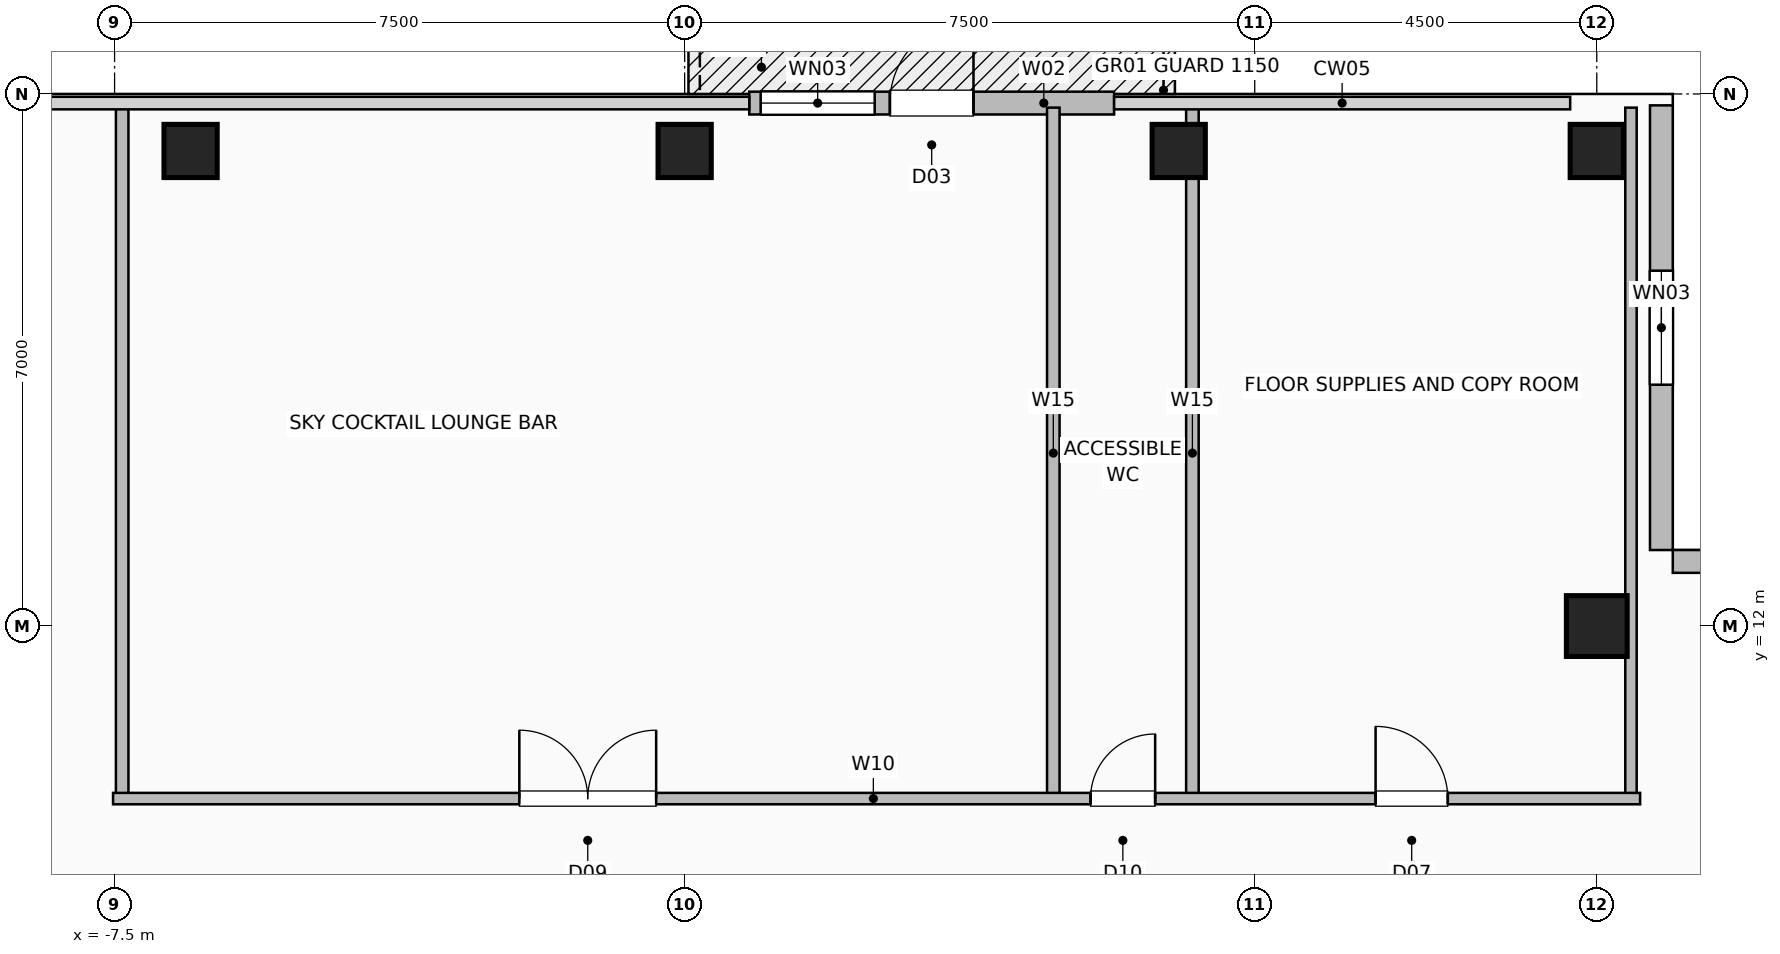
"""IFC4 building model, lengths in metres.
Left out: names, types, materials, properties, quantities, classifications, styles, units other than length and angle.
Written with IfcOpenShell. Run it as: python <this file> out.ifc"""

import sys

from ifc_helpers import new_model, si_unit, direction, frame, frame_2d, origin, origin_2d, place, context, subcontext, project, spatial, rectangle, hollow_rectangle, extrude, element, fill, save


model = new_model("IFC4")
c1 = context("Model", 3, precision=1e-05, world=origin(), true_north=direction((0.0, 1.0)))
c2 = subcontext(c1, "Body", "Model", "MODEL_VIEW")
j1 = project(units=[si_unit("LENGTHUNIT", "METRE"), si_unit("PLANEANGLEUNIT", "RADIAN")], contexts=[c1])
p1 = place(None, origin())
s1 = spatial("IfcSite", under=j1, at=p1, CompositionType="ELEMENT")
p2 = place(p1, origin())
s2 = spatial("IfcBuilding", under=s1, at=p2, CompositionType="ELEMENT")
p3 = place(p2, frame((0.0, 0.0, 254.0)))
s3 = spatial("IfcBuildingStorey", under=s2, at=p3, CompositionType="ELEMENT", Elevation=254.0)
for number, where, z_axis, x_axis in (
    (1, (-6.5, 18.25, 0.0), (0.0, 0.0, 1.0), (1.0, 0.0, 0.0)),
    (2, (0.0, 18.25, 0.0), (0.0, 0.0, 1.0), (1.0, 0.0, 0.0)),
    (3, (6.5, 18.25, 0.0), (0.0, 0.0, 1.0), (1.0, 0.0, 0.0)),
    (4, (12.0, 18.25, 0.0), (0.0, 0.0, 1.0), (1.0, 0.0, 0.0)),
):
    element("IfcColumn", number, at=place(p3, frame(where, z_axis=z_axis, x_axis=x_axis)), inside=s3, PredefinedType="COLUMN", context=c2, shape_type="SweptSolid", body=[
        extrude(hollow_rectangle(XDim=0.7, YDim=0.7, WallThickness=0.035, at=origin_2d()), origin(), (0.0, 0.0, 1.0), 3.6),
    ])
p4 = place(p3, frame((12.0, 12.0, 0.0), z_axis=(0.0, 0.0, 1.0), x_axis=(1.0, 0.0, 0.0)))
e5 = element("IfcColumn", 5, at=p4, inside=s3, PredefinedType="COLUMN", context=c2, shape_type="SweptSolid", body=[
    extrude(hollow_rectangle(XDim=0.8, YDim=0.8, WallThickness=0.04, at=origin_2d()), origin(), (0.0, 0.0, 1.0), 3.6),
])
p5 = place(p3, frame((0.85, 18.88, 0.0), z_axis=(0.0, 0.0, 1.0), x_axis=(1.0, 0.0, 0.0)))
e6 = element("IfcWall", 6, at=p5, inside=s3, PredefinedType="SOLIDWALL", context=c2, shape_type="SweptSolid", body=[
    extrude(rectangle(XDim=4.8, YDim=0.3, at=frame_2d((2.4, 0.0))), origin(), (0.0, 0.0, 1.0), 3.36),
])
p6 = place(p5, frame((1.85, 0.0, 0.0)))
e7 = element("IfcOpeningElement", 7, at=p6, cuts=e6, PredefinedType="OPENING", context=c2, shape_type="SweptSolid", body=[
    extrude(rectangle(XDim=1.1, YDim=2.2, at=frame_2d((0.55, 1.1))), frame((0.0, 0.16, 0.0), z_axis=(0.0, -1.0, 0.0), x_axis=(1.0, 0.0, 0.0)), (0.0, 0.0, 1.0), 0.32),
])
p7 = place(p5, frame((0.15, 0.0, 0.85)))
e8 = element("IfcOpeningElement", 8, at=p7, cuts=e6, PredefinedType="OPENING", context=c2, shape_type="SweptSolid", body=[
    extrude(rectangle(XDim=1.5, YDim=1.8, at=frame_2d((0.75, 0.9))), frame((0.0, 0.16, 0.0), z_axis=(0.0, -1.0, 0.0), x_axis=(1.0, 0.0, 0.0)), (0.0, 0.0, 1.0), 0.32),
])
p8 = place(p3, frame((12.85, 18.85, 0.0), z_axis=(0.0, 0.0, 1.0), x_axis=(0.0, -1.0, 0.0)))
e9 = element("IfcWall", 9, at=p8, inside=s3, PredefinedType="SOLIDWALL", context=c2, shape_type="SweptSolid", body=[
    extrude(rectangle(XDim=5.85, YDim=0.3, at=frame_2d((2.925, 0.0))), origin(), (0.0, 0.0, 1.0), 3.36),
])
p9 = place(p8, frame((2.175, 0.0, 0.9)))
e10 = element("IfcOpeningElement", 10, at=p9, cuts=e9, PredefinedType="OPENING", context=c2, shape_type="SweptSolid", body=[
    extrude(rectangle(XDim=1.5, YDim=1.8, at=frame_2d((0.75, 0.9))), frame((0.0, 0.16, 0.0), z_axis=(0.0, -1.0, 0.0), x_axis=(1.0, 0.0, 0.0)), (0.0, 0.0, 1.0), 0.32),
])
p10 = place(p3, frame((18.85, 12.85, 0.0), z_axis=(0.0, 0.0, 1.0), x_axis=(-1.0, 0.0, 0.0)))
e11 = element("IfcWall", 11, at=p10, inside=s3, PredefinedType="SOLIDWALL", context=c2, shape_type="SweptSolid", body=[
    extrude(rectangle(XDim=5.85, YDim=0.3, at=frame_2d((2.925, 0.0))), origin(), (0.0, 0.0, 1.0), 3.36),
])
for number, where, z_axis, x_axis in (
    (12, (6.68, 9.73, 0.0), (0.0, 0.0, 1.0), (0.0, 1.0, 0.0)),
    (13, (-7.4, 9.73, 0.0), (0.0, 0.0, 1.0), (0.0, 1.0, 0.0)),
    (14, (4.85, 9.73, 0.0), (0.0, 0.0, 1.0), (0.0, 1.0, 0.0)),
):
    element("IfcWall", number, at=place(p3, frame(where, z_axis=z_axis, x_axis=x_axis)), inside=s3, PredefinedType="PLUMBINGWALL", context=c2, shape_type="SweptSolid", body=[
        extrude(rectangle(XDim=9.09, YDim=0.165, at=frame_2d((4.545, 0.0))), origin(), (0.0, 0.0, 1.0), 3.36),
    ])
p11 = place(p3, frame((12.45, 9.73, 0.0), z_axis=(0.0, 0.0, 1.0), x_axis=(0.0, 1.0, 0.0)))
e15 = element("IfcWall", 15, at=p11, inside=s3, PredefinedType="PARTITIONING", context=c2, shape_type="SweptSolid", body=[
    extrude(rectangle(XDim=9.09, YDim=0.15, at=frame_2d((4.545, 0.0))), origin(), (0.0, 0.0, 1.0), 3.36),
])
p12 = place(p3, frame((-7.52, 9.73, 0.0), z_axis=(0.0, 0.0, 1.0), x_axis=(1.0, 0.0, 0.0)))
e16 = element("IfcWall", 16, at=p12, inside=s3, PredefinedType="PARTITIONING", context=c2, shape_type="SweptSolid", body=[
    extrude(rectangle(XDim=20.09, YDim=0.15, at=frame_2d((10.045, 0.0))), origin(), (0.0, 0.0, 1.0), 3.36),
])
p13 = place(p12, frame((5.345, 0.0, 0.0)))
e17 = element("IfcOpeningElement", 17, at=p13, cuts=e16, PredefinedType="OPENING", context=c2, shape_type="SweptSolid", body=[
    extrude(rectangle(XDim=1.8, YDim=2.08, at=frame_2d((0.9, 1.04))), frame((0.0, 0.085, 0.0), z_axis=(0.0, -1.0, 0.0), x_axis=(1.0, 0.0, 0.0)), (0.0, 0.0, 1.0), 0.17),
])
p14 = place(p12, frame((12.86, 0.0, 0.0)))
e18 = element("IfcOpeningElement", 18, at=p14, cuts=e16, PredefinedType="OPENING", context=c2, shape_type="SweptSolid", body=[
    extrude(rectangle(XDim=0.85, YDim=2.05, at=frame_2d((0.425, 1.025))), frame((0.0, 0.085, 0.0), z_axis=(0.0, -1.0, 0.0), x_axis=(1.0, 0.0, 0.0)), (0.0, 0.0, 1.0), 0.17),
])
p15 = place(p12, frame((16.61, 0.0, 0.0)))
e19 = element("IfcOpeningElement", 19, at=p15, cuts=e16, PredefinedType="OPENING", context=c2, shape_type="SweptSolid", body=[
    extrude(rectangle(XDim=0.95, YDim=2.06, at=frame_2d((0.475, 1.03))), frame((0.0, 0.085, 0.0), z_axis=(0.0, -1.0, 0.0), x_axis=(1.0, 0.0, 0.0)), (0.0, 0.0, 1.0), 0.17),
])
p16 = place(p6, origin())
e20 = element("IfcDoor", 20, at=p16, inside=s3, OperationType="SINGLE_SWING_RIGHT", PredefinedType="DOOR", context=c2, shape_type="SweptSolid", body=[
    extrude(rectangle(XDim=1.1, YDim=2.2, at=frame_2d((0.55, 1.1))), frame((0.0, 0.025, 0.0), z_axis=(0.0, -1.0, 0.0), x_axis=(1.0, 0.0, 0.0)), (0.0, 0.0, 1.0), 0.05),
])
fill(e7, e20)
p17 = place(p7, origin())
e21 = element("IfcWindow", 21, at=p17, inside=s3, PartitioningType="SINGLE_PANEL", PredefinedType="WINDOW", context=c2, shape_type="SweptSolid", body=[
    extrude(rectangle(XDim=1.5, YDim=1.8, at=frame_2d((0.75, 0.9))), frame((0.0, 0.03, 0.0), z_axis=(0.0, -1.0, 0.0), x_axis=(1.0, 0.0, 0.0)), (0.0, 0.0, 1.0), 0.06),
])
fill(e8, e21)
p18 = place(p9, origin())
e22 = element("IfcWindow", 22, at=p18, inside=s3, PartitioningType="SINGLE_PANEL", PredefinedType="WINDOW", context=c2, shape_type="SweptSolid", body=[
    extrude(rectangle(XDim=1.5, YDim=1.8, at=frame_2d((0.75, 0.9))), frame((0.0, 0.03, 0.0), z_axis=(0.0, -1.0, 0.0), x_axis=(1.0, 0.0, 0.0)), (0.0, 0.0, 1.0), 0.06),
])
fill(e10, e22)
p19 = place(p13, origin())
e23 = element("IfcDoor", 23, at=p19, inside=s3, OperationType="DOUBLE_DOOR_SINGLE_SWING", PredefinedType="DOOR", context=c2, shape_type="SweptSolid", body=[
    extrude(rectangle(XDim=1.8, YDim=2.08, at=frame_2d((0.9, 1.04))), frame((0.0, 0.025, 0.0), z_axis=(0.0, -1.0, 0.0), x_axis=(1.0, 0.0, 0.0)), (0.0, 0.0, 1.0), 0.05),
])
fill(e17, e23)
p20 = place(p14, origin())
e24 = element("IfcDoor", 24, at=p20, inside=s3, OperationType="SINGLE_SWING_RIGHT", PredefinedType="DOOR", context=c2, shape_type="SweptSolid", body=[
    extrude(rectangle(XDim=0.85, YDim=2.05, at=frame_2d((0.425, 1.025))), frame((0.0, 0.025, 0.0), z_axis=(0.0, -1.0, 0.0), x_axis=(1.0, 0.0, 0.0)), (0.0, 0.0, 1.0), 0.05),
])
fill(e18, e24)
p21 = place(p15, origin())
e25 = element("IfcDoor", 25, at=p21, inside=s3, OperationType="SINGLE_SWING_LEFT", PredefinedType="DOOR", context=c2, shape_type="SweptSolid", body=[
    extrude(rectangle(XDim=0.95, YDim=2.06, at=frame_2d((0.475, 1.03))), frame((0.0, 0.025, 0.0), z_axis=(0.0, -1.0, 0.0), x_axis=(1.0, 0.0, 0.0)), (0.0, 0.0, 1.0), 0.05),
])
fill(e19, e25)
save(model, sys.argv[1])
